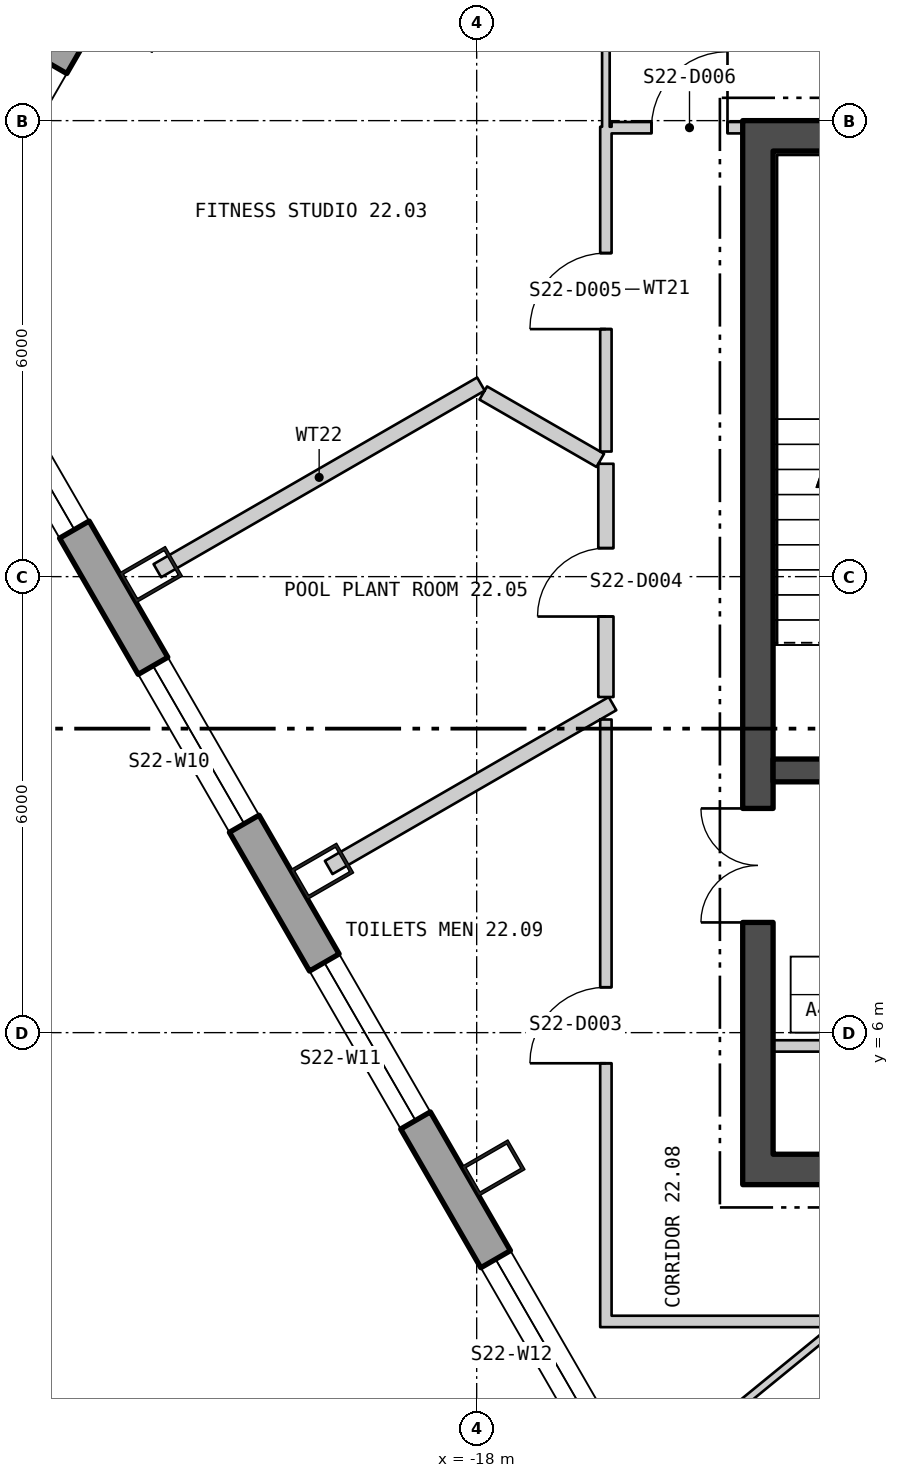
"""IFC4 building model, lengths in metres.
Left out: names, types, materials, properties, quantities, classifications, styles, units other than length and angle.
Written with IfcOpenShell. Run it as: python <this file> out.ifc"""

import sys

from ifc_helpers import new_model, si_unit, direction, frame, frame_2d, origin, origin_2d, place, context, subcontext, project, spatial, polyline, rectangle, hollow_rectangle, outline, extrude, element, fill, save


model = new_model("IFC4")
c1 = context("Model", 3, precision=1e-05, world=origin(), true_north=direction((0.0, 1.0)))
c2 = subcontext(c1, "Body", "Model", "MODEL_VIEW")
j1 = project(units=[si_unit("LENGTHUNIT", "METRE"), si_unit("PLANEANGLEUNIT", "RADIAN")], contexts=[c1])
p1 = place(None, origin())
s1 = spatial("IfcSite", under=j1, at=p1, CompositionType="ELEMENT")
p2 = place(p1, origin())
s2 = spatial("IfcBuilding", under=s1, at=p2, CompositionType="ELEMENT")
p3 = place(p2, frame((0.0, 0.0, 298.2)))
s3 = spatial("IfcBuildingStorey", under=s2, at=p3, CompositionType="ELEMENT", Elevation=298.2)
for number, where, z_axis, x_axis in (
    (1, (-22.461, 19.267, 0.0), (0.0, 0.0, 1.0), (-0.5, -0.866, 0.0)),
    (2, (-22.287, 12.027, 0.0), (0.0, 0.0, 1.0), (0.5, -0.866, 0.0)),
    (3, (-20.034, 8.123, 0.0), (0.0, 0.0, 1.0), (0.5, -0.866, 0.0)),
    (4, (-17.78, 4.219, 0.0), (0.0, 0.0, 1.0), (0.5, -0.866, 0.0)),
):
    element("IfcColumn", number, at=place(p3, frame(where, z_axis=z_axis, x_axis=x_axis)), inside=s3, PredefinedType="COLUMN", context=c2, shape_type="SweptSolid", body=[
        extrude(hollow_rectangle(XDim=0.45, YDim=0.7, WallThickness=0.04, at=origin_2d()), origin(), (0.0, 0.0, 1.0), 6.0),
    ])
p4 = place(p3, frame((-22.87, 19.975, -0.4), z_axis=(0.0, 0.0, 1.0), x_axis=(-0.500001097856, -0.866024769936, 0.0)))
e5 = element("IfcWall", 5, at=p4, inside=s3, PredefinedType="SOLIDWALL", context=c2, shape_type="SweptSolid", body=[
    extrude(outline(polyline([(-0.13, -0.225), (4.8, -0.225), (4.54, 0.225), (0.13, 0.225), (-0.13, -0.225)])), origin(), (0.0, 0.0, 1.0), 6.0),
])
p5 = place(p4, frame((1.435, 0.0, 1.3)))
e6 = element("IfcOpeningElement", 6, at=p5, cuts=e5, PredefinedType="OPENING", context=c2, shape_type="SweptSolid", body=[
    extrude(rectangle(XDim=1.8, YDim=4.1, at=frame_2d((0.9, 2.05))), frame((0.0, 0.235, 0.0), z_axis=(0.0, -1.0, 0.0), x_axis=(1.0, 0.0, 0.0)), (0.0, 0.0, 1.0), 0.47),
])
p6 = place(p3, frame((-25.205, 15.931, -0.28), z_axis=(0.0, 0.0, 1.0), x_axis=(0.499999764979, -0.866025539474, 0.0)))
e7 = element("IfcWall", 7, at=p6, inside=s3, PredefinedType="SOLIDWALL", context=c2, shape_type="SweptSolid", body=[
    extrude(outline(polyline([(-0.13, -0.225), (45.87, -0.225), (45.61, 0.225), (0.13, 0.225), (-0.13, -0.225)])), origin(), (0.0, 0.0, 1.0), 6.1),
])
p7 = place(p6, frame((1.424, 0.0, 1.18)))
e8 = element("IfcOpeningElement", 8, at=p7, cuts=e7, PredefinedType="OPENING", context=c2, shape_type="SweptSolid", body=[
    extrude(rectangle(XDim=2.4, YDim=4.1, at=frame_2d((1.2, 2.05))), frame((0.0, 0.235, 0.0), z_axis=(0.0, -1.0, 0.0), x_axis=(1.0, 0.0, 0.0)), (0.0, 0.0, 1.0), 0.47),
])
p8 = place(p6, frame((5.893, 0.0, 1.18)))
e9 = element("IfcOpeningElement", 9, at=p8, cuts=e7, PredefinedType="OPENING", context=c2, shape_type="SweptSolid", body=[
    extrude(rectangle(XDim=2.4, YDim=4.1, at=frame_2d((1.2, 2.05))), frame((0.0, 0.235, 0.0), z_axis=(0.0, -1.0, 0.0), x_axis=(1.0, 0.0, 0.0)), (0.0, 0.0, 1.0), 0.47),
])
p9 = place(p6, frame((10.401, 0.0, 1.18)))
e10 = element("IfcOpeningElement", 10, at=p9, cuts=e7, PredefinedType="OPENING", context=c2, shape_type="SweptSolid", body=[
    extrude(rectangle(XDim=2.4, YDim=4.1, at=frame_2d((1.2, 2.05))), frame((0.0, 0.235, 0.0), z_axis=(0.0, -1.0, 0.0), x_axis=(1.0, 0.0, 0.0)), (0.0, 0.0, 1.0), 0.47),
])
p10 = place(p6, frame((14.909, 0.0, 1.18)))
e11 = element("IfcOpeningElement", 11, at=p10, cuts=e7, PredefinedType="OPENING", context=c2, shape_type="SweptSolid", body=[
    extrude(rectangle(XDim=2.4, YDim=4.1, at=frame_2d((1.2, 2.05))), frame((0.0, 0.235, 0.0), z_axis=(0.0, -1.0, 0.0), x_axis=(1.0, 0.0, 0.0)), (0.0, 0.0, 1.0), 0.47),
])
p11 = place(p6, frame((19.416, 0.0, 1.18)))
e12 = element("IfcOpeningElement", 12, at=p11, cuts=e7, PredefinedType="OPENING", context=c2, shape_type="SweptSolid", body=[
    extrude(rectangle(XDim=2.4, YDim=4.1, at=frame_2d((1.2, 2.05))), frame((0.0, 0.235, 0.0), z_axis=(0.0, -1.0, 0.0), x_axis=(1.0, 0.0, 0.0)), (0.0, 0.0, 1.0), 0.47),
])
p12 = place(p6, frame((23.924, 0.0, 1.18)))
e13 = element("IfcOpeningElement", 13, at=p12, cuts=e7, PredefinedType="OPENING", context=c2, shape_type="SweptSolid", body=[
    extrude(rectangle(XDim=2.4, YDim=4.1, at=frame_2d((1.2, 2.05))), frame((0.0, 0.235, 0.0), z_axis=(0.0, -1.0, 0.0), x_axis=(1.0, 0.0, 0.0)), (0.0, 0.0, 1.0), 0.47),
])
p13 = place(p6, frame((28.431, 0.0, 1.18)))
e14 = element("IfcOpeningElement", 14, at=p13, cuts=e7, PredefinedType="OPENING", context=c2, shape_type="SweptSolid", body=[
    extrude(rectangle(XDim=2.4, YDim=4.1, at=frame_2d((1.2, 2.05))), frame((0.0, 0.235, 0.0), z_axis=(0.0, -1.0, 0.0), x_axis=(1.0, 0.0, 0.0)), (0.0, 0.0, 1.0), 0.47),
])
p14 = place(p6, frame((32.939, 0.0, 1.18)))
e15 = element("IfcOpeningElement", 15, at=p14, cuts=e7, PredefinedType="OPENING", context=c2, shape_type="SweptSolid", body=[
    extrude(rectangle(XDim=2.4, YDim=4.1, at=frame_2d((1.2, 2.05))), frame((0.0, 0.235, 0.0), z_axis=(0.0, -1.0, 0.0), x_axis=(1.0, 0.0, 0.0)), (0.0, 0.0, 1.0), 0.47),
])
p15 = place(p6, frame((37.447, 0.0, 1.18)))
e16 = element("IfcOpeningElement", 16, at=p15, cuts=e7, PredefinedType="OPENING", context=c2, shape_type="SweptSolid", body=[
    extrude(rectangle(XDim=2.4, YDim=4.1, at=frame_2d((1.2, 2.05))), frame((0.0, 0.235, 0.0), z_axis=(0.0, -1.0, 0.0), x_axis=(1.0, 0.0, 0.0)), (0.0, 0.0, 1.0), 0.47),
])
p16 = place(p6, frame((41.916, 0.0, 1.18)))
e17 = element("IfcOpeningElement", 17, at=p16, cuts=e7, PredefinedType="OPENING", context=c2, shape_type="SweptSolid", body=[
    extrude(rectangle(XDim=2.4, YDim=4.1, at=frame_2d((1.2, 2.05))), frame((0.0, 0.235, 0.0), z_axis=(0.0, -1.0, 0.0), x_axis=(1.0, 0.0, 0.0)), (0.0, 0.0, 1.0), 0.47),
])
p17 = place(p3, frame((-14.5, 4.2, 0.0), z_axis=(0.0, 0.0, 1.0), x_axis=(1.0, 0.0, 0.0)))
e18 = element("IfcWall", 18, at=p17, inside=s3, PredefinedType="SHEAR", context=c2, shape_type="SweptSolid", body=[
    extrude(rectangle(XDim=29.0, YDim=0.4, at=frame_2d((14.5, 0.0))), origin(), (0.0, 0.0, 1.0), 5.8),
])
p18 = place(p17, frame((9.0, 0.0, 0.0)))
e19 = element("IfcOpeningElement", 19, at=p18, cuts=e18, PredefinedType="OPENING", context=c2, shape_type="SweptSolid", body=[
    extrude(rectangle(XDim=1.8, YDim=2.4, at=frame_2d((0.9, 1.2))), frame((0.0, 0.21, 0.0), z_axis=(0.0, -1.0, 0.0), x_axis=(1.0, 0.0, 0.0)), (0.0, 0.0, 1.0), 0.42),
])
p19 = place(p17, frame((19.0, 0.0, 0.0)))
e20 = element("IfcOpeningElement", 20, at=p19, cuts=e18, PredefinedType="OPENING", context=c2, shape_type="SweptSolid", body=[
    extrude(rectangle(XDim=1.8, YDim=2.4, at=frame_2d((0.9, 1.2))), frame((0.0, 0.21, 0.0), z_axis=(0.0, -1.0, 0.0), x_axis=(1.0, 0.0, 0.0)), (0.0, 0.0, 1.0), 0.42),
])
p20 = place(p3, frame((-14.5, 17.8, 0.0), z_axis=(0.0, 0.0, 1.0), x_axis=(1.0, 0.0, 0.0)))
e21 = element("IfcWall", 21, at=p20, inside=s3, PredefinedType="SHEAR", context=c2, shape_type="SweptSolid", body=[
    extrude(rectangle(XDim=29.0, YDim=0.4, at=frame_2d((14.5, 0.0))), origin(), (0.0, 0.0, 1.0), 5.8),
])
p21 = place(p3, frame((-14.3, 4.4, 0.0), z_axis=(0.0, 0.0, 1.0), x_axis=(0.0, 1.0, 0.0)))
e22 = element("IfcWall", 22, at=p21, inside=s3, PredefinedType="SHEAR", context=c2, shape_type="SweptSolid", body=[
    extrude(rectangle(XDim=13.2, YDim=0.4, at=frame_2d((6.6, 0.0))), origin(), (0.0, 0.0, 1.0), 5.8),
])
p22 = place(p21, frame((3.05, 0.0, 0.0)))
e23 = element("IfcOpeningElement", 23, at=p22, cuts=e22, PredefinedType="OPENING", context=c2, shape_type="SweptSolid", body=[
    extrude(rectangle(XDim=1.5, YDim=2.1, at=frame_2d((0.75, 1.05))), frame((0.0, 0.21, 0.0), z_axis=(0.0, -1.0, 0.0), x_axis=(1.0, 0.0, 0.0)), (0.0, 0.0, 1.0), 0.42),
])
p23 = place(p3, frame((-14.1, 9.45, 0.0), z_axis=(0.0, 0.0, 1.0), x_axis=(1.0, 0.0, 0.0)))
e24 = element("IfcWall", 24, at=p23, inside=s3, PredefinedType="SHEAR", context=c2, shape_type="SweptSolid", body=[
    extrude(rectangle(XDim=3.1, YDim=0.3, at=frame_2d((1.55, 0.0))), origin(), (0.0, 0.0, 1.0), 5.8),
])
p24 = place(p23, frame((0.95, 0.0, 0.0)))
e25 = element("IfcOpeningElement", 25, at=p24, cuts=e24, PredefinedType="OPENING", context=c2, shape_type="SweptSolid", body=[
    extrude(rectangle(XDim=1.2, YDim=2.1, at=frame_2d((0.6, 1.05))), frame((0.0, 0.16, 0.0), z_axis=(0.0, -1.0, 0.0), x_axis=(1.0, 0.0, 0.0)), (0.0, 0.0, 1.0), 0.32),
])
p25 = place(p3, frame((-14.1, 5.825, 0.0), z_axis=(0.0, 0.0, 1.0), x_axis=(1.0, 0.0, 0.0)))
e26 = element("IfcWall", 26, at=p25, inside=s3, PredefinedType="PARTITIONING", context=c2, shape_type="SweptSolid", body=[
    extrude(rectangle(XDim=3.1, YDim=0.15, at=frame_2d((1.55, 0.0))), origin(), (0.0, 0.0, 1.0), 5.8),
])
p26 = place(p3, frame((-22.201, 12.078, 0.0), z_axis=(0.0, 0.0, 1.0), x_axis=(0.866182198585, 0.499728325047, 0.0)))
e27 = element("IfcWall", 27, at=p26, inside=s3, PredefinedType="PARTITIONING", context=c2, shape_type="SweptSolid", body=[
    extrude(rectangle(XDim=4.915, YDim=0.2, at=frame_2d((2.457, 0.0))), origin(), (0.0, 0.0, 1.0), 5.8),
])
p27 = place(p3, frame((-19.947, 8.173, 0.0), z_axis=(0.0, 0.0, 1.0), x_axis=(0.866007919525, 0.500030282404, 0.0)))
e28 = element("IfcWall", 28, at=p27, inside=s3, PredefinedType="PARTITIONING", context=c2, shape_type="SweptSolid", body=[
    extrude(rectangle(XDim=4.312, YDim=0.2, at=frame_2d((2.156, 0.0))), origin(), (0.0, 0.0, 1.0), 5.8),
])
p28 = place(p3, frame((-17.913, 14.416, 0.0), z_axis=(0.0, 0.0, 1.0), x_axis=(0.866644592537, -0.498925996743, 0.0)))
e29 = element("IfcWall", 29, at=p28, inside=s3, PredefinedType="PARTITIONING", context=c2, shape_type="SweptSolid", body=[
    extrude(rectangle(XDim=1.776, YDim=0.2, at=frame_2d((0.888, 0.0))), origin(), (0.0, 0.0, 1.0), 5.8),
])
p29 = place(p3, frame((-16.375, 2.2, 0.0), z_axis=(0.0, 0.0, 1.0), x_axis=(1.0, 0.0, 0.0)))
e30 = element("IfcWall", 30, at=p29, inside=s3, PredefinedType="PARTITIONING", context=c2, shape_type="SweptSolid", body=[
    extrude(rectangle(XDim=8.67, YDim=0.15, at=frame_2d((4.335, 0.0))), origin(), (0.0, 0.0, 1.0), 5.8),
])
p30 = place(p29, frame((4.613, 0.0, 0.0)))
e31 = element("IfcOpeningElement", 31, at=p30, cuts=e30, PredefinedType="OPENING", context=c2, shape_type="SweptSolid", body=[
    extrude(rectangle(XDim=1.0, YDim=2.1, at=frame_2d((0.5, 1.05))), frame((0.0, 0.085, 0.0), z_axis=(0.0, -1.0, 0.0), x_axis=(1.0, 0.0, 0.0)), (0.0, 0.0, 1.0), 0.17),
])
p31 = place(p29, frame((7.354, 0.0, 0.0)))
e32 = element("IfcOpeningElement", 32, at=p31, cuts=e30, PredefinedType="OPENING", context=c2, shape_type="SweptSolid", body=[
    extrude(rectangle(XDim=1.0, YDim=2.1, at=frame_2d((0.5, 1.05))), frame((0.0, 0.085, 0.0), z_axis=(0.0, -1.0, 0.0), x_axis=(1.0, 0.0, 0.0)), (0.0, 0.0, 1.0), 0.17),
])
p32 = place(p3, frame((-16.3, 2.275, 0.0), z_axis=(0.0, 0.0, 1.0), x_axis=(0.0, 1.0, 0.0)))
e33 = element("IfcWall", 33, at=p32, inside=s3, PredefinedType="PARTITIONING", context=c2, shape_type="SweptSolid", body=[
    extrude(rectangle(XDim=7.845, YDim=0.15, at=frame_2d((3.922, 0.0))), origin(), (0.0, 0.0, 1.0), 5.8),
])
p33 = place(p32, frame((3.322, 0.0, 0.0)))
e34 = element("IfcOpeningElement", 34, at=p33, cuts=e33, PredefinedType="OPENING", context=c2, shape_type="SweptSolid", body=[
    extrude(rectangle(XDim=1.0, YDim=2.1, at=frame_2d((0.5, 1.05))), frame((0.0, 0.085, 0.0), z_axis=(0.0, -1.0, 0.0), x_axis=(1.0, 0.0, 0.0)), (0.0, 0.0, 1.0), 0.17),
])
p34 = place(p3, frame((-16.3, 10.416, 0.0), z_axis=(0.0, 0.0, 1.0), x_axis=(0.0, 1.0, 0.0)))
e35 = element("IfcWall", 35, at=p34, inside=s3, PredefinedType="PARTITIONING", context=c2, shape_type="SweptSolid", body=[
    extrude(rectangle(XDim=3.069, YDim=0.2, at=frame_2d((1.534, 0.0))), origin(), (0.0, 0.0, 1.0), 5.8),
])
p35 = place(p34, frame((1.059, 0.0, 0.0)))
e36 = element("IfcOpeningElement", 36, at=p35, cuts=e35, PredefinedType="OPENING", context=c2, shape_type="SweptSolid", body=[
    extrude(rectangle(XDim=0.9, YDim=2.1, at=frame_2d((0.45, 1.05))), frame((0.0, 0.11, 0.0), z_axis=(0.0, -1.0, 0.0), x_axis=(1.0, 0.0, 0.0)), (0.0, 0.0, 1.0), 0.22),
])
p36 = place(p3, frame((-16.3, 13.646, 0.0), z_axis=(0.0, 0.0, 1.0), x_axis=(0.0, 1.0, 0.0)))
e37 = element("IfcWall", 37, at=p36, inside=s3, PredefinedType="PARTITIONING", context=c2, shape_type="SweptSolid", body=[
    extrude(rectangle(XDim=4.273, YDim=0.15, at=frame_2d((2.136, 0.0))), origin(), (0.0, 0.0, 1.0), 5.8),
])
p37 = place(p36, frame((1.611, 0.0, 0.0)))
e38 = element("IfcOpeningElement", 38, at=p37, cuts=e37, PredefinedType="OPENING", context=c2, shape_type="SweptSolid", body=[
    extrude(rectangle(XDim=1.0, YDim=2.1, at=frame_2d((0.5, 1.05))), frame((0.0, 0.085, 0.0), z_axis=(0.0, -1.0, 0.0), x_axis=(1.0, 0.0, 0.0)), (0.0, 0.0, 1.0), 0.17),
])
p38 = place(p3, frame((-16.3, 17.919, 0.0), z_axis=(0.0, 0.0, 1.0), x_axis=(0.0, 1.0, 0.0)))
e39 = element("IfcWall", 39, at=p38, inside=s3, PredefinedType="PARTITIONING", context=c2, shape_type="SweptSolid", body=[
    extrude(rectangle(XDim=1.831, YDim=0.1, at=frame_2d((0.915, 0.0))), origin(), (0.0, 0.0, 1.0), 5.8),
])
p39 = place(p3, frame((-16.225, 17.907, 0.0), z_axis=(0.0, 0.0, 1.0), x_axis=(1.0, 0.0, 0.0)))
e40 = element("IfcWall", 40, at=p39, inside=s3, PredefinedType="PARTITIONING", context=c2, shape_type="SweptSolid", body=[
    extrude(rectangle(XDim=1.725, YDim=0.15, at=frame_2d((0.863, 0.0))), origin(), (0.0, 0.0, 1.0), 5.4),
])
p40 = place(p39, frame((0.525, 0.0, 0.0)))
e41 = element("IfcOpeningElement", 41, at=p40, cuts=e40, PredefinedType="OPENING", context=c2, shape_type="SweptSolid", body=[
    extrude(rectangle(XDim=1.0, YDim=2.1, at=frame_2d((0.5, 1.05))), frame((0.0, 0.085, 0.0), z_axis=(0.0, -1.0, 0.0), x_axis=(1.0, 0.0, 0.0)), (0.0, 0.0, 1.0), 0.17),
])
p41 = place(p3, frame((-15.436, 0.363, 0.0), z_axis=(0.0, 0.0, 1.0), x_axis=(0.774415182093, 0.632677742412, 0.0)))
e42 = element("IfcWall", 42, at=p41, inside=s3, PredefinedType="PARTITIONING", context=c2, shape_type="SweptSolid", body=[
    extrude(rectangle(XDim=2.723, YDim=0.1, at=frame_2d((1.362, 0.0))), origin(), (0.0, 0.0, 1.0), 5.8),
])
p42 = place(p5, origin())
e43 = element("IfcWindow", 43, at=p42, inside=s3, PartitioningType="SINGLE_PANEL", PredefinedType="WINDOW", context=c2, shape_type="SweptSolid", body=[
    extrude(rectangle(XDim=1.8, YDim=4.1, at=frame_2d((0.9, 2.05))), frame((0.0, 0.105, 0.0), z_axis=(0.0, -1.0, 0.0), x_axis=(1.0, 0.0, 0.0)), (0.0, 0.0, 1.0), 0.06),
])
fill(e6, e43)
p43 = place(p7, origin())
e44 = element("IfcWindow", 44, at=p43, inside=s3, PartitioningType="SINGLE_PANEL", PredefinedType="WINDOW", context=c2, shape_type="SweptSolid", body=[
    extrude(rectangle(XDim=2.4, YDim=4.1, at=frame_2d((1.2, 2.05))), frame((0.0, 0.105, 0.0), z_axis=(0.0, -1.0, 0.0), x_axis=(1.0, 0.0, 0.0)), (0.0, 0.0, 1.0), 0.06),
])
fill(e8, e44)
p44 = place(p8, origin())
e45 = element("IfcWindow", 45, at=p44, inside=s3, PartitioningType="SINGLE_PANEL", PredefinedType="WINDOW", context=c2, shape_type="SweptSolid", body=[
    extrude(rectangle(XDim=2.4, YDim=4.1, at=frame_2d((1.2, 2.05))), frame((0.0, 0.105, 0.0), z_axis=(0.0, -1.0, 0.0), x_axis=(1.0, 0.0, 0.0)), (0.0, 0.0, 1.0), 0.06),
])
fill(e9, e45)
p45 = place(p9, origin())
e46 = element("IfcWindow", 46, at=p45, inside=s3, PartitioningType="SINGLE_PANEL", PredefinedType="WINDOW", context=c2, shape_type="SweptSolid", body=[
    extrude(rectangle(XDim=2.4, YDim=4.1, at=frame_2d((1.2, 2.05))), frame((0.0, 0.105, 0.0), z_axis=(0.0, -1.0, 0.0), x_axis=(1.0, 0.0, 0.0)), (0.0, 0.0, 1.0), 0.06),
])
fill(e10, e46)
p46 = place(p10, origin())
e47 = element("IfcWindow", 47, at=p46, inside=s3, PartitioningType="SINGLE_PANEL", PredefinedType="WINDOW", context=c2, shape_type="SweptSolid", body=[
    extrude(rectangle(XDim=2.4, YDim=4.1, at=frame_2d((1.2, 2.05))), frame((0.0, 0.105, 0.0), z_axis=(0.0, -1.0, 0.0), x_axis=(1.0, 0.0, 0.0)), (0.0, 0.0, 1.0), 0.06),
])
fill(e11, e47)
p47 = place(p22, origin())
e48 = element("IfcDoor", 48, at=p47, inside=s3, OperationType="DOUBLE_DOOR_SINGLE_SWING", PredefinedType="DOOR", context=c2, shape_type="SweptSolid", body=[
    extrude(rectangle(XDim=1.5, YDim=2.1, at=frame_2d((0.75, 1.05))), frame((0.0, 0.025, 0.0), z_axis=(0.0, -1.0, 0.0), x_axis=(1.0, 0.0, 0.0)), (0.0, 0.0, 1.0), 0.05),
])
fill(e23, e48)
p48 = place(p33, origin())
e49 = element("IfcDoor", 49, at=p48, inside=s3, OperationType="SINGLE_SWING_RIGHT", PredefinedType="DOOR", context=c2, shape_type="SweptSolid", body=[
    extrude(rectangle(XDim=1.0, YDim=2.1, at=frame_2d((0.5, 1.05))), frame((0.0, 0.025, 0.0), z_axis=(0.0, -1.0, 0.0), x_axis=(1.0, 0.0, 0.0)), (0.0, 0.0, 1.0), 0.05),
])
fill(e34, e49)
p49 = place(p35, origin())
e50 = element("IfcDoor", 50, at=p49, inside=s3, OperationType="SINGLE_SWING_RIGHT", PredefinedType="DOOR", context=c2, shape_type="SweptSolid", body=[
    extrude(rectangle(XDim=0.9, YDim=2.1, at=frame_2d((0.45, 1.05))), frame((0.0, 0.025, 0.0), z_axis=(0.0, -1.0, 0.0), x_axis=(1.0, 0.0, 0.0)), (0.0, 0.0, 1.0), 0.05),
])
fill(e36, e50)
p50 = place(p37, origin())
e51 = element("IfcDoor", 51, at=p50, inside=s3, OperationType="SINGLE_SWING_RIGHT", PredefinedType="DOOR", context=c2, shape_type="SweptSolid", body=[
    extrude(rectangle(XDim=1.0, YDim=2.1, at=frame_2d((0.5, 1.05))), frame((0.0, 0.025, 0.0), z_axis=(0.0, -1.0, 0.0), x_axis=(1.0, 0.0, 0.0)), (0.0, 0.0, 1.0), 0.05),
])
fill(e38, e51)
p51 = place(p40, origin())
e52 = element("IfcDoor", 52, at=p51, inside=s3, OperationType="SINGLE_SWING_LEFT", PredefinedType="DOOR", context=c2, shape_type="SweptSolid", body=[
    extrude(rectangle(XDim=1.0, YDim=2.1, at=frame_2d((0.5, 1.05))), frame((0.0, 0.025, 0.0), z_axis=(0.0, -1.0, 0.0), x_axis=(1.0, 0.0, 0.0)), (0.0, 0.0, 1.0), 0.05),
])
fill(e41, e52)
save(model, sys.argv[1])
